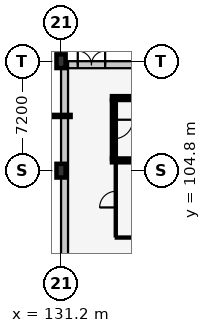
"""IFC4 building model, lengths in metres.
Left out: names, types, materials, properties, quantities, classifications, styles, units other than length and angle.
Written with IfcOpenShell. Run it as: python <this file> out.ifc"""

import sys

from ifc_helpers import new_model, si_unit, direction, frame, frame_2d, origin, origin_2d, place, context, subcontext, project, spatial, rectangle, extrude, element, fill, save


model = new_model("IFC4")
c1 = context("Model", 3, precision=1e-05, world=origin(), true_north=direction((0.0, 1.0)))
c2 = subcontext(c1, "Body", "Model", "MODEL_VIEW")
j1 = project(units=[si_unit("LENGTHUNIT", "METRE"), si_unit("PLANEANGLEUNIT", "RADIAN")], contexts=[c1])
p1 = place(None, origin())
s1 = spatial("IfcSite", under=j1, at=p1, CompositionType="ELEMENT")
p2 = place(p1, origin())
s2 = spatial("IfcBuilding", under=s1, at=p2, CompositionType="ELEMENT")
p3 = place(p2, origin())
s3 = spatial("IfcBuildingStorey", under=s2, at=p3, CompositionType="ELEMENT", Elevation=0.0)
for number, where, z_axis, x_axis in (
    (1, (131.2, 104.8, 0.0), (0.0, 0.0, 1.0), (1.0, 0.0, 0.0)),
    (2, (131.2, 112.0, 0.0), (0.0, 0.0, 1.0), (1.0, 0.0, 0.0)),
):
    element("IfcColumn", number, at=place(p3, frame(where, z_axis=z_axis, x_axis=x_axis)), inside=s3, PredefinedType="COLUMN", context=c2, shape_type="SweptSolid", body=[
        extrude(rectangle(XDim=0.6, YDim=0.9, at=origin_2d()), origin(), (0.0, 0.0, 1.0), 5.4),
    ])
p4 = place(p3, frame((131.2, 111.77, 0.0), z_axis=(0.0, 0.0, 1.0), x_axis=(1.0, 0.0, 0.0)))
e3 = element("IfcWall", 3, at=p4, inside=s3, PredefinedType="SOLIDWALL", context=c2, shape_type="SweptSolid", body=[
    extrude(rectangle(XDim=28.8, YDim=0.46, at=frame_2d((14.4, 0.0))), origin(), (0.0, 0.0, 1.0), 4.435),
])
p5 = place(p4, frame((1.1, 0.0, 0.0)))
e4 = element("IfcOpeningElement", 4, at=p5, cuts=e3, PredefinedType="OPENING", context=c2, shape_type="SweptSolid", body=[
    extrude(rectangle(XDim=1.8, YDim=2.3, at=frame_2d((0.9, 1.15))), frame((0.0, 0.242, 0.0), z_axis=(0.0, -1.0, 0.0), x_axis=(1.0, 0.0, 0.0)), (0.0, 0.0, 1.0), 0.484),
])
p6 = place(p3, frame((131.43, 83.2, 0.0), z_axis=(0.0, 0.0, 1.0), x_axis=(0.0, 1.0, 0.0)))
e5 = element("IfcWall", 5, at=p6, inside=s3, PredefinedType="SOLIDWALL", context=c2, shape_type="SweptSolid", body=[
    extrude(rectangle(XDim=28.8, YDim=0.46, at=frame_2d((14.4, 0.0))), origin(), (0.0, 0.0, 1.0), 4.535),
])
p7 = place(p6, frame((9.8, 0.0, 0.0)))
e6 = element("IfcOpeningElement", 6, at=p7, cuts=e5, PredefinedType="OPENING", context=c2, shape_type="SweptSolid", body=[
    extrude(rectangle(XDim=2.0, YDim=2.35, at=frame_2d((1.0, 1.175))), frame((0.0, 0.242, 0.0), z_axis=(0.0, -1.0, 0.0), x_axis=(1.0, 0.0, 0.0)), (0.0, 0.0, 1.0), 0.484),
])
for number, where, z_axis, x_axis in (
    (7, (134.55, 105.475, 0.0), (0.0, 0.0, 1.0), (1.0, 0.0, 0.0)),
    (8, (143.45, 109.575, 0.0), (0.0, 0.0, 1.0), (-1.0, 0.0, 0.0)),
):
    element("IfcWall", number, at=place(p3, frame(where, z_axis=z_axis, x_axis=x_axis)), inside=s3, PredefinedType="SHEAR", context=c2, shape_type="SweptSolid", body=[
        extrude(rectangle(XDim=8.9, YDim=0.25, at=frame_2d((4.45, 0.0))), origin(), (0.0, 0.0, 1.0), 5.14),
    ])
p8 = place(p3, frame((134.675, 109.45, 0.0), z_axis=(0.0, 0.0, 1.0), x_axis=(0.0, -1.0, 0.0)))
e9 = element("IfcWall", 9, at=p8, inside=s3, PredefinedType="SHEAR", context=c2, shape_type="SweptSolid", body=[
    extrude(rectangle(XDim=3.85, YDim=0.25, at=frame_2d((1.925, 0.0))), origin(), (0.0, 0.0, 1.0), 5.14),
])
p9 = place(p8, frame((1.3, 0.0, 0.0)))
e10 = element("IfcOpeningElement", 10, at=p9, cuts=e9, PredefinedType="OPENING", context=c2, shape_type="SweptSolid", body=[
    extrude(rectangle(XDim=1.25, YDim=2.15, at=frame_2d((0.625, 1.075))), frame((0.0, 0.137, 0.0), z_axis=(0.0, -1.0, 0.0), x_axis=(1.0, 0.0, 0.0)), (0.0, 0.0, 1.0), 0.274),
])
p10 = place(p3, frame((134.8, 100.4, 0.0), z_axis=(0.0, 0.0, 1.0), x_axis=(1.0, 0.0, 0.0)))
e11 = element("IfcWall", 11, at=p10, inside=s3, PredefinedType="PARTITIONING", context=c2, shape_type="SweptSolid", body=[
    extrude(rectangle(XDim=2.6, YDim=0.14, at=frame_2d((1.3, 0.0))), origin(), (0.0, 0.0, 1.0), 5.14),
])
p11 = place(p3, frame((134.8, 100.48, 0.0), z_axis=(0.0, 0.0, 1.0), x_axis=(0.0, 1.0, 0.0)))
e12 = element("IfcWall", 12, at=p11, inside=s3, PredefinedType="PARTITIONING", context=c2, shape_type="SweptSolid", body=[
    extrude(rectangle(XDim=4.86, YDim=0.14, at=frame_2d((2.43, 0.0))), origin(), (0.0, 0.0, 1.0), 4.725),
])
p12 = place(p11, frame((1.9, 0.0, 0.0)))
e13 = element("IfcOpeningElement", 13, at=p12, cuts=e12, PredefinedType="OPENING", context=c2, shape_type="SweptSolid", body=[
    extrude(rectangle(XDim=1.06, YDim=2.1, at=frame_2d((0.53, 1.05))), frame((0.0, 0.082, 0.0), z_axis=(0.0, -1.0, 0.0), x_axis=(1.0, 0.0, 0.0)), (0.0, 0.0, 1.0), 0.164),
])
p13 = place(p5, origin())
e14 = element("IfcDoor", 14, at=p13, inside=s3, OperationType="DOUBLE_DOOR_SINGLE_SWING", PredefinedType="DOOR", context=c2, shape_type="SweptSolid", body=[
    extrude(rectangle(XDim=1.8, YDim=2.3, at=frame_2d((0.9, 1.15))), frame((0.0, 0.025, 0.0), z_axis=(0.0, -1.0, 0.0), x_axis=(1.0, 0.0, 0.0)), (0.0, 0.0, 1.0), 0.05),
])
fill(e4, e14)
p14 = place(p9, origin())
e15 = element("IfcDoor", 15, at=p14, inside=s3, OperationType="SINGLE_SWING_LEFT", PredefinedType="DOOR", context=c2, shape_type="SweptSolid", body=[
    extrude(rectangle(XDim=1.25, YDim=2.15, at=frame_2d((0.625, 1.075))), frame((0.0, 0.025, 0.0), z_axis=(0.0, -1.0, 0.0), x_axis=(1.0, 0.0, 0.0)), (0.0, 0.0, 1.0), 0.05),
])
fill(e10, e15)
p15 = place(p12, origin())
e16 = element("IfcDoor", 16, at=p15, inside=s3, OperationType="SINGLE_SWING_LEFT", PredefinedType="DOOR", context=c2, shape_type="SweptSolid", body=[
    extrude(rectangle(XDim=1.06, YDim=2.1, at=frame_2d((0.53, 1.05))), frame((0.0, 0.025, 0.0), z_axis=(0.0, -1.0, 0.0), x_axis=(1.0, 0.0, 0.0)), (0.0, 0.0, 1.0), 0.05),
])
fill(e13, e16)
save(model, sys.argv[1])
